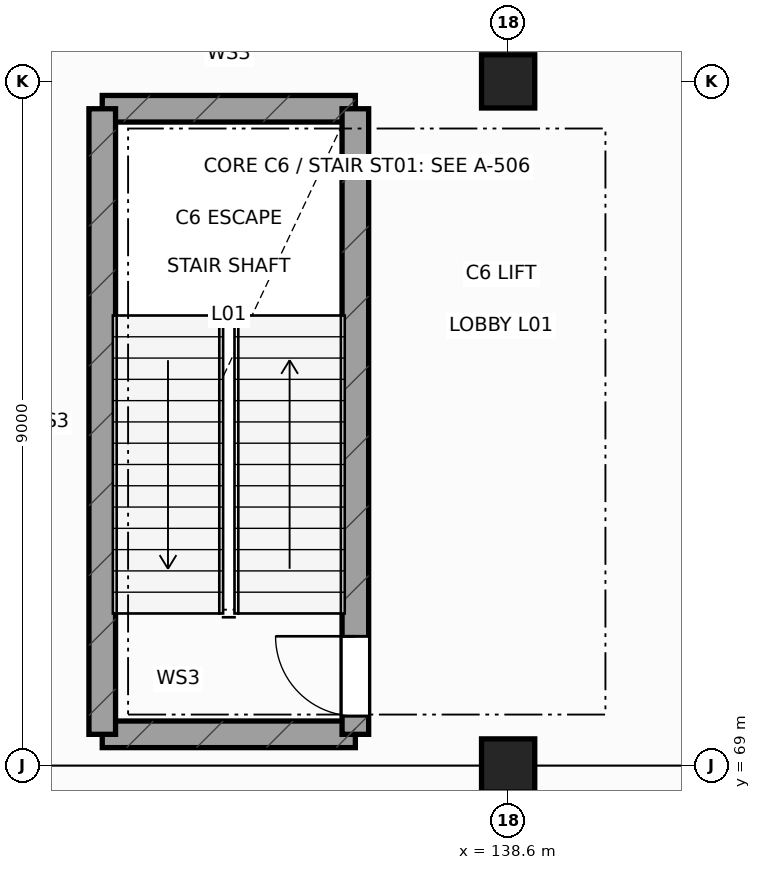
"""IFC4 building model, lengths in metres.
Left out: names, types, materials, properties, quantities, classifications, styles, units other than length and angle.
Written with IfcOpenShell. Run it as: python <this file> out.ifc"""

import sys

from ifc_helpers import new_model, si_unit, direction, frame, frame_2d, origin, origin_2d, place, context, subcontext, project, spatial, rectangle, extrude, element, fill, save


model = new_model("IFC4")
c1 = context("Model", 3, precision=1e-05, world=origin(), true_north=direction((0.0, 1.0)))
c2 = subcontext(c1, "Body", "Model", "MODEL_VIEW")
j1 = project(units=[si_unit("LENGTHUNIT", "METRE"), si_unit("PLANEANGLEUNIT", "RADIAN")], contexts=[c1])
p1 = place(None, origin())
s1 = spatial("IfcSite", under=j1, at=p1, CompositionType="ELEMENT")
p2 = place(p1, origin())
s2 = spatial("IfcBuilding", under=s1, at=p2, CompositionType="ELEMENT")
p3 = place(p2, frame((0.0, 0.0, 6.0)))
s3 = spatial("IfcBuildingStorey", under=s2, at=p3, CompositionType="ELEMENT", Elevation=6.0)
for number, where, z_axis, x_axis in (
    (1, (138.6, 69.0, 0.0), (0.0, 0.0, 1.0), (1.0, 0.0, 0.0)),
    (2, (138.6, 78.0, 0.0), (0.0, 0.0, 1.0), (1.0, 0.0, 0.0)),
):
    element("IfcColumn", number, at=place(p3, frame(where, z_axis=z_axis, x_axis=x_axis)), inside=s3, PredefinedType="COLUMN", context=c2, shape_type="SweptSolid", body=[
        extrude(rectangle(XDim=0.7, YDim=0.7, at=origin_2d()), origin(), (0.0, 0.0, 1.0), 5.4),
    ])
for number, where, z_axis, x_axis in (
    (3, (133.26, 69.41, 0.0), (0.0, 0.0, 1.0), (1.0, 0.0, 0.0)),
    (4, (133.26, 77.64, 0.0), (0.0, 0.0, 1.0), (1.0, 0.0, 0.0)),
):
    element("IfcWall", number, at=place(p3, frame(where, z_axis=z_axis, x_axis=x_axis)), inside=s3, PredefinedType="SHEAR", context=c2, shape_type="SweptSolid", body=[
        extrude(rectangle(XDim=3.33, YDim=0.35, at=frame_2d((1.665, 0.0))), origin(), (0.0, 0.0, 1.0), 5.05),
    ])
p4 = place(p3, frame((133.26, 69.41, 0.0), z_axis=(0.0, 0.0, 1.0), x_axis=(0.0, 1.0, 0.0)))
e5 = element("IfcWall", 5, at=p4, inside=s3, PredefinedType="SHEAR", context=c2, shape_type="SweptSolid", body=[
    extrude(rectangle(XDim=8.23, YDim=0.35, at=frame_2d((4.115, 0.0))), origin(), (0.0, 0.0, 1.0), 5.05),
])
p5 = place(p3, frame((136.59, 69.41, 0.0), z_axis=(0.0, 0.0, 1.0), x_axis=(0.0, 1.0, 0.0)))
e6 = element("IfcWall", 6, at=p5, inside=s3, PredefinedType="SHEAR", context=c2, shape_type="SweptSolid", body=[
    extrude(rectangle(XDim=8.23, YDim=0.35, at=frame_2d((4.115, 0.0))), origin(), (0.0, 0.0, 1.0), 5.05),
])
p6 = place(p5, frame((0.24, 0.0, 0.0)))
e7 = element("IfcOpeningElement", 7, at=p6, cuts=e6, PredefinedType="OPENING", context=c2, shape_type="SweptSolid", body=[
    extrude(rectangle(XDim=1.05, YDim=2.18, at=frame_2d((0.525, 1.09))), frame((0.0, 0.185, 0.0), z_axis=(0.0, -1.0, 0.0), x_axis=(1.0, 0.0, 0.0)), (0.0, 0.0, 1.0), 0.37),
])
p7 = place(p6, origin())
e8 = element("IfcDoor", 8, at=p7, inside=s3, OperationType="SINGLE_SWING_RIGHT", PredefinedType="DOOR", context=c2, shape_type="SweptSolid", body=[
    extrude(rectangle(XDim=1.05, YDim=2.18, at=frame_2d((0.525, 1.09))), frame((0.0, 0.025, 0.0), z_axis=(0.0, -1.0, 0.0), x_axis=(1.0, 0.0, 0.0)), (0.0, 0.0, 1.0), 0.05),
])
fill(e7, e8)
save(model, sys.argv[1])
